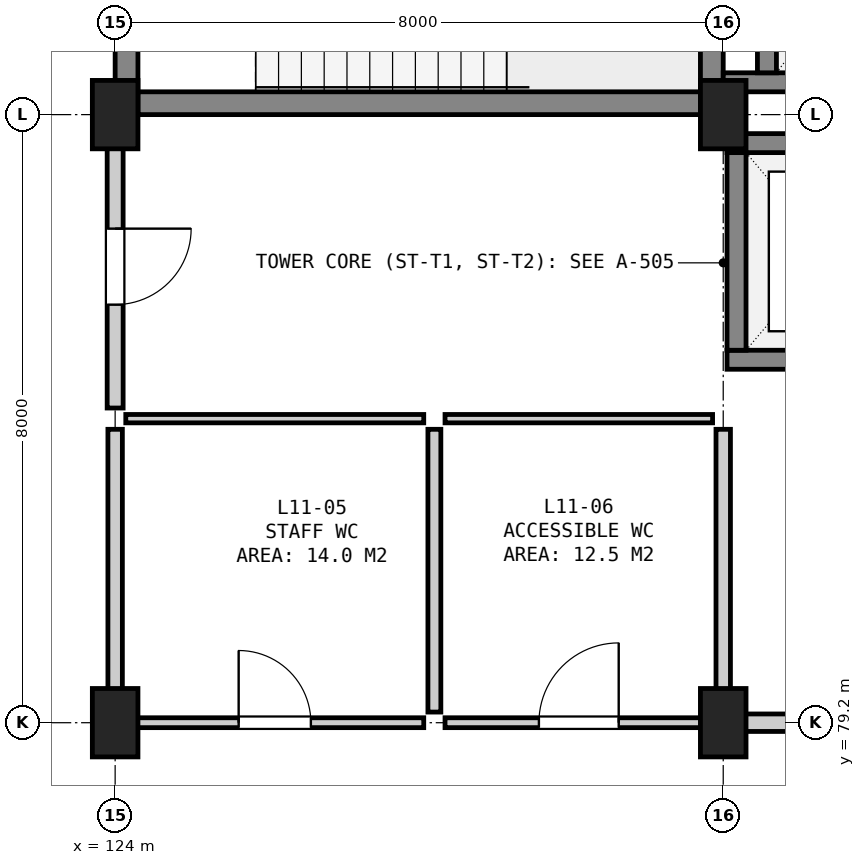
"""IFC4 building model, lengths in metres.
Left out: names, types, materials, properties, quantities, classifications, styles, units other than length and angle.
Written with IfcOpenShell. Run it as: python <this file> out.ifc"""

import sys

from ifc_helpers import new_model, si_unit, direction, frame, frame_2d, origin, origin_2d, place, context, subcontext, project, spatial, rectangle, extrude, element, fill, save


model = new_model("IFC4")
c1 = context("Model", 3, precision=1e-05, world=origin(), true_north=direction((0.0, 1.0)))
c2 = subcontext(c1, "Body", "Model", "MODEL_VIEW")
j1 = project(units=[si_unit("LENGTHUNIT", "METRE"), si_unit("PLANEANGLEUNIT", "RADIAN")], contexts=[c1])
p1 = place(None, origin())
s1 = spatial("IfcSite", under=j1, at=p1, CompositionType="ELEMENT")
p2 = place(p1, origin())
s2 = spatial("IfcBuilding", under=s1, at=p2, CompositionType="ELEMENT")
p3 = place(p2, frame((0.0, 0.0, 47.1)))
s3 = spatial("IfcBuildingStorey", under=s2, at=p3, CompositionType="ELEMENT", Elevation=47.1)
for number, where, z_axis, x_axis in (
    (1, (124.0, 79.2, 0.0), (0.0, 0.0, 1.0), (1.0, 0.0, 0.0)),
    (2, (124.0, 87.2, 0.0), (0.0, 0.0, 1.0), (1.0, 0.0, 0.0)),
    (3, (132.0, 79.2, 0.0), (0.0, 0.0, 1.0), (1.0, 0.0, 0.0)),
    (4, (132.0, 87.2, 0.0), (0.0, 0.0, 1.0), (1.0, 0.0, 0.0)),
):
    element("IfcColumn", number, at=place(p3, frame(where, z_axis=z_axis, x_axis=x_axis)), inside=s3, PredefinedType="COLUMN", context=c2, shape_type="SweptSolid", body=[
        extrude(rectangle(XDim=0.6, YDim=0.9, at=origin_2d()), origin(), (0.0, 0.0, 1.0), 3.8),
    ])
for number, where, z_axis, x_axis in (
    (5, (124.15, 87.2, 0.0), (0.0, 0.0, 1.0), (0.0, 1.0, 0.0)),
    (6, (131.85, 87.2, 0.0), (0.0, 0.0, 1.0), (0.0, 1.0, 0.0)),
):
    element("IfcWall", number, at=place(p3, frame(where, z_axis=z_axis, x_axis=x_axis)), inside=s3, PredefinedType="SHEAR", context=c2, shape_type="SweptSolid", body=[
        extrude(rectangle(XDim=4.2, YDim=0.3, at=frame_2d((2.1, 0.0))), origin(), (0.0, 0.0, 1.0), 3.52),
    ])
p4 = place(p3, frame((124.3, 87.35, 0.0), z_axis=(0.0, 0.0, 1.0), x_axis=(1.0, 0.0, 0.0)))
e7 = element("IfcWall", 7, at=p4, inside=s3, PredefinedType="SHEAR", context=c2, shape_type="SweptSolid", body=[
    extrude(rectangle(XDim=7.4, YDim=0.3, at=frame_2d((3.7, 0.0))), origin(), (0.0, 0.0, 1.0), 3.52),
])
p5 = place(p3, frame((132.0, 87.625, 0.0), z_axis=(0.0, 0.0, 1.0), x_axis=(1.0, 0.0, 0.0)))
e8 = element("IfcWall", 8, at=p5, inside=s3, PredefinedType="SHEAR", context=c2, shape_type="SweptSolid", body=[
    extrude(rectangle(XDim=3.15, YDim=0.25, at=frame_2d((1.575, 0.0))), origin(), (0.0, 0.0, 1.0), 3.52),
])
p6 = place(p3, frame((132.575, 87.75, 0.0), z_axis=(0.0, 0.0, 1.0), x_axis=(0.0, 1.0, 0.0)))
e9 = element("IfcWall", 9, at=p6, inside=s3, PredefinedType="SHEAR", context=c2, shape_type="SweptSolid", body=[
    extrude(rectangle(XDim=2.9, YDim=0.25, at=frame_2d((1.45, 0.0))), origin(), (0.0, 0.0, 1.0), 3.52),
])
p7 = place(p3, frame((132.05, 83.975, 0.0), z_axis=(0.0, 0.0, 1.0), x_axis=(1.0, 0.0, 0.0)))
e10 = element("IfcWall", 10, at=p7, inside=s3, PredefinedType="SHEAR", context=c2, shape_type="SweptSolid", body=[
    extrude(rectangle(XDim=2.7, YDim=0.25, at=frame_2d((1.35, 0.0))), origin(), (0.0, 0.0, 1.0), 3.52),
])
p8 = place(p7, frame((0.8, 0.0, 0.0)))
e11 = element("IfcOpeningElement", 11, at=p8, cuts=e10, PredefinedType="OPENING", context=c2, shape_type="SweptSolid", body=[
    extrude(rectangle(XDim=1.1, YDim=2.15, at=frame_2d((0.55, 1.075))), frame((0.0, 0.137, 0.0), z_axis=(0.0, -1.0, 0.0), x_axis=(1.0, 0.0, 0.0)), (0.0, 0.0, 1.0), 0.274),
])
p9 = place(p3, frame((132.05, 86.825, 0.0), z_axis=(0.0, 0.0, 1.0), x_axis=(1.0, 0.0, 0.0)))
e12 = element("IfcWall", 12, at=p9, inside=s3, PredefinedType="SHEAR", context=c2, shape_type="SweptSolid", body=[
    extrude(rectangle(XDim=2.7, YDim=0.25, at=frame_2d((1.35, 0.0))), origin(), (0.0, 0.0, 1.0), 3.52),
])
p10 = place(p3, frame((132.175, 84.1, 0.0), z_axis=(0.0, 0.0, 1.0), x_axis=(0.0, 1.0, 0.0)))
e13 = element("IfcWall", 13, at=p10, inside=s3, PredefinedType="SHEAR", context=c2, shape_type="SweptSolid", body=[
    extrude(rectangle(XDim=2.6, YDim=0.25, at=frame_2d((1.3, 0.0))), origin(), (0.0, 0.0, 1.0), 3.52),
])
p11 = place(p3, frame((124.14, 79.2, 0.0), z_axis=(0.0, 0.0, 1.0), x_axis=(1.0, 0.0, 0.0)))
e14 = element("IfcWall", 14, at=p11, inside=s3, PredefinedType="PARTITIONING", context=c2, shape_type="SweptSolid", body=[
    extrude(rectangle(XDim=3.92, YDim=0.13, at=frame_2d((1.96, 0.0))), origin(), (0.0, 0.0, 1.0), 2.895),
])
p12 = place(p11, frame((1.485, 0.0, 0.0)))
e15 = element("IfcOpeningElement", 15, at=p12, cuts=e14, PredefinedType="OPENING", context=c2, shape_type="SweptSolid", body=[
    extrude(rectangle(XDim=0.95, YDim=2.15, at=frame_2d((0.475, 1.075))), frame((0.0, 0.077, 0.0), z_axis=(0.0, -1.0, 0.0), x_axis=(1.0, 0.0, 0.0)), (0.0, 0.0, 1.0), 0.154),
])
p13 = place(p3, frame((124.14, 83.2, 0.0), z_axis=(0.0, 0.0, 1.0), x_axis=(1.0, 0.0, 0.0)))
e16 = element("IfcWall", 16, at=p13, inside=s3, PredefinedType="PARTITIONING", context=c2, shape_type="SweptSolid", body=[
    extrude(rectangle(XDim=3.92, YDim=0.11, at=frame_2d((1.96, 0.0))), origin(), (0.0, 0.0, 1.0), 3.52),
])
p14 = place(p3, frame((124.0, 79.34, 0.0), z_axis=(0.0, 0.0, 1.0), x_axis=(0.0, 1.0, 0.0)))
e17 = element("IfcWall", 17, at=p14, inside=s3, PredefinedType="PARTITIONING", context=c2, shape_type="SweptSolid", body=[
    extrude(rectangle(XDim=3.72, YDim=0.19, at=frame_2d((1.86, 0.0))), origin(), (0.0, 0.0, 1.0), 2.995),
])
p15 = place(p3, frame((128.2, 79.34, 0.0), z_axis=(0.0, 0.0, 1.0), x_axis=(0.0, 1.0, 0.0)))
e18 = element("IfcWall", 18, at=p15, inside=s3, PredefinedType="PARTITIONING", context=c2, shape_type="SweptSolid", body=[
    extrude(rectangle(XDim=3.72, YDim=0.17, at=frame_2d((1.86, 0.0))), origin(), (0.0, 0.0, 1.0), 3.52),
])
p16 = place(p3, frame((128.34, 79.2, 0.0), z_axis=(0.0, 0.0, 1.0), x_axis=(1.0, 0.0, 0.0)))
e19 = element("IfcWall", 19, at=p16, inside=s3, PredefinedType="PARTITIONING", context=c2, shape_type="SweptSolid", body=[
    extrude(rectangle(XDim=3.52, YDim=0.13, at=frame_2d((1.76, 0.0))), origin(), (0.0, 0.0, 1.0), 2.895),
])
p17 = place(p16, frame((1.235, 0.0, 0.0)))
e20 = element("IfcOpeningElement", 20, at=p17, cuts=e19, PredefinedType="OPENING", context=c2, shape_type="SweptSolid", body=[
    extrude(rectangle(XDim=1.05, YDim=2.15, at=frame_2d((0.525, 1.075))), frame((0.0, 0.077, 0.0), z_axis=(0.0, -1.0, 0.0), x_axis=(1.0, 0.0, 0.0)), (0.0, 0.0, 1.0), 0.154),
])
p18 = place(p3, frame((128.34, 83.2, 0.0), z_axis=(0.0, 0.0, 1.0), x_axis=(1.0, 0.0, 0.0)))
e21 = element("IfcWall", 21, at=p18, inside=s3, PredefinedType="PARTITIONING", context=c2, shape_type="SweptSolid", body=[
    extrude(rectangle(XDim=3.52, YDim=0.11, at=frame_2d((1.76, 0.0))), origin(), (0.0, 0.0, 1.0), 3.52),
])
p19 = place(p3, frame((132.0, 79.34, 0.0), z_axis=(0.0, 0.0, 1.0), x_axis=(0.0, 1.0, 0.0)))
e22 = element("IfcWall", 22, at=p19, inside=s3, PredefinedType="PARTITIONING", context=c2, shape_type="SweptSolid", body=[
    extrude(rectangle(XDim=3.72, YDim=0.19, at=frame_2d((1.86, 0.0))), origin(), (0.0, 0.0, 1.0), 2.795),
])
p20 = place(p3, frame((124.0, 83.34, 0.0), z_axis=(0.0, 0.0, 1.0), x_axis=(0.0, 1.0, 0.0)))
e23 = element("IfcWall", 23, at=p20, inside=s3, PredefinedType="SOLIDWALL", context=c2, shape_type="SweptSolid", body=[
    extrude(rectangle(XDim=3.72, YDim=0.21, at=frame_2d((1.86, 0.0))), origin(), (0.0, 0.0, 1.0), 2.995),
])
p21 = place(p20, frame((1.36, 0.0, 0.0)))
e24 = element("IfcOpeningElement", 24, at=p21, cuts=e23, PredefinedType="OPENING", context=c2, shape_type="SweptSolid", body=[
    extrude(rectangle(XDim=1.0, YDim=2.15, at=frame_2d((0.5, 1.075))), frame((0.0, 0.117, 0.0), z_axis=(0.0, -1.0, 0.0), x_axis=(1.0, 0.0, 0.0)), (0.0, 0.0, 1.0), 0.234),
])
p22 = place(p3, frame((132.14, 79.2, 0.0), z_axis=(0.0, 0.0, 1.0), x_axis=(1.0, 0.0, 0.0)))
e25 = element("IfcWall", 25, at=p22, inside=s3, PredefinedType="SOLIDWALL", context=c2, shape_type="SweptSolid", body=[
    extrude(rectangle(XDim=7.72, YDim=0.23, at=frame_2d((3.86, 0.0))), origin(), (0.0, 0.0, 1.0), 2.945),
])
p23 = place(p22, frame((3.11, 0.0, 0.0)))
e26 = element("IfcOpeningElement", 26, at=p23, cuts=e25, PredefinedType="OPENING", context=c2, shape_type="SweptSolid", body=[
    extrude(rectangle(XDim=1.5, YDim=2.2, at=frame_2d((0.75, 1.1))), frame((0.0, 0.127, 0.0), z_axis=(0.0, -1.0, 0.0), x_axis=(1.0, 0.0, 0.0)), (0.0, 0.0, 1.0), 0.254),
])
p24 = place(p12, origin())
e27 = element("IfcDoor", 27, at=p24, inside=s3, OperationType="SINGLE_SWING_LEFT", PredefinedType="DOOR", context=c2, shape_type="SweptSolid", body=[
    extrude(rectangle(XDim=0.95, YDim=2.15, at=frame_2d((0.475, 1.075))), frame((0.0, 0.025, 0.0), z_axis=(0.0, -1.0, 0.0), x_axis=(1.0, 0.0, 0.0)), (0.0, 0.0, 1.0), 0.05),
])
fill(e15, e27)
p25 = place(p17, origin())
e28 = element("IfcDoor", 28, at=p25, inside=s3, OperationType="SINGLE_SWING_RIGHT", PredefinedType="DOOR", context=c2, shape_type="SweptSolid", body=[
    extrude(rectangle(XDim=1.05, YDim=2.15, at=frame_2d((0.525, 1.075))), frame((0.0, 0.025, 0.0), z_axis=(0.0, -1.0, 0.0), x_axis=(1.0, 0.0, 0.0)), (0.0, 0.0, 1.0), 0.05),
])
fill(e20, e28)
p26 = place(p21, frame((1.0, 0.0, 0.0), z_axis=(0.0, 0.0, 1.0), x_axis=(-1.0, 0.0, 0.0)))
e29 = element("IfcDoor", 29, at=p26, inside=s3, OperationType="SINGLE_SWING_LEFT", PredefinedType="DOOR", context=c2, shape_type="SweptSolid", body=[
    extrude(rectangle(XDim=1.0, YDim=2.15, at=frame_2d((0.5, 1.075))), frame((0.0, 0.025, 0.0), z_axis=(0.0, -1.0, 0.0), x_axis=(1.0, 0.0, 0.0)), (0.0, 0.0, 1.0), 0.05),
])
fill(e24, e29)
save(model, sys.argv[1])
